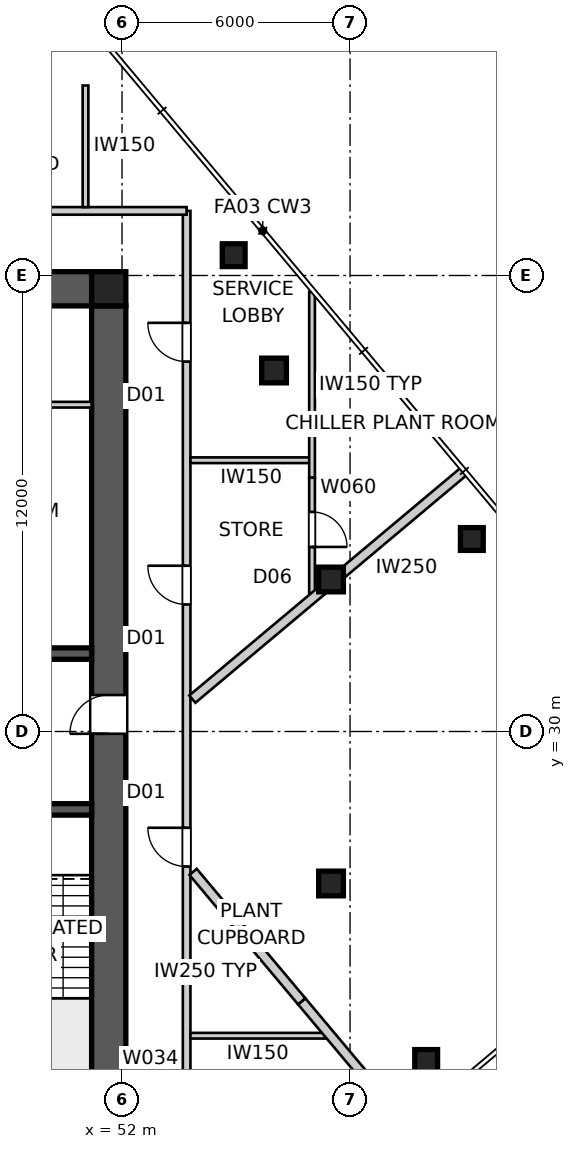
"""IFC4 building model, lengths in metres.
Left out: names, types, materials, properties, quantities, classifications, styles, units other than length and angle.
Written with IfcOpenShell. Run it as: python <this file> out.ifc"""

import sys

from ifc_helpers import new_model, si_unit, direction, frame, frame_2d, origin, origin_2d, place, context, subcontext, project, spatial, polyline, rectangle, outline, extrude, element, fill, save


model = new_model("IFC4")
c1 = context("Model", 3, precision=1e-05, world=origin(), true_north=direction((0.0, 1.0)))
c2 = subcontext(c1, "Body", "Model", "MODEL_VIEW")
j1 = project(units=[si_unit("LENGTHUNIT", "METRE"), si_unit("PLANEANGLEUNIT", "RADIAN")], contexts=[c1])
p1 = place(None, origin())
s1 = spatial("IfcSite", under=j1, at=p1, CompositionType="ELEMENT")
p2 = place(p1, origin())
s2 = spatial("IfcBuilding", under=s1, at=p2, CompositionType="ELEMENT")
p3 = place(p2, frame((0.0, 0.0, 299.8)))
s3 = spatial("IfcBuildingStorey", under=s2, at=p3, CompositionType="ELEMENT", Elevation=299.8)
p4 = place(p3, frame((28.8, 41.65, 0.0), z_axis=(0.0, 0.0, 1.0), x_axis=(1.0, 0.0, 0.0)))
e1 = element("IfcWall", 1, at=p4, inside=s3, PredefinedType="SHEAR", context=c2, shape_type="SweptSolid", body=[
    extrude(outline(polyline([(0.0, -0.45), (22.4, -0.45), (22.4, -0.025), (22.85, -0.025), (22.85, 0.025), (22.4, 0.025), (22.4, 0.45), (0.0, 0.45), (0.0, 0.025), (-0.45, 0.025), (-0.45, -0.025), (0.0, -0.025), (0.0, -0.45)])), origin(), (0.0, 0.0, 1.0), 4.5),
])
p5 = place(p3, frame((51.65, 18.8, 0.0), z_axis=(0.0, 0.0, 1.0), x_axis=(0.0, 1.0, 0.0)))
e2 = element("IfcWall", 2, at=p5, inside=s3, PredefinedType="SHEAR", context=c2, shape_type="SweptSolid", body=[
    extrude(outline(polyline([(0.0, -0.45), (22.4, -0.45), (22.4, -0.025), (22.85, -0.025), (22.85, 0.025), (22.4, 0.025), (22.4, 0.45), (0.0, 0.45), (0.0, 0.025), (-0.45, 0.025), (-0.45, -0.025), (0.0, -0.025), (0.0, -0.45)])), origin(), (0.0, 0.0, 1.0), 4.5),
])
p6 = place(p5, frame((11.14, 0.0, 0.0)))
e3 = element("IfcOpeningElement", 3, at=p6, cuts=e2, PredefinedType="OPENING", context=c2, shape_type="SweptSolid", body=[
    extrude(rectangle(XDim=1.02, YDim=2.4, at=frame_2d((0.51, 1.2))), frame((0.0, 0.46, 0.0), z_axis=(0.0, -1.0, 0.0), x_axis=(1.0, 0.0, 0.0)), (0.0, 0.0, 1.0), 0.92),
])
p7 = place(p3, frame((28.8, 32.05, 0.0), z_axis=(0.0, 0.0, 1.0), x_axis=(1.0, 0.0, 0.0)))
e4 = element("IfcWall", 4, at=p7, inside=s3, PredefinedType="SHEAR", context=c2, shape_type="SweptSolid", body=[
    extrude(rectangle(XDim=22.4, YDim=0.3, at=frame_2d((11.2, 0.0))), origin(), (0.0, 0.0, 1.0), 4.5),
])
p8 = place(p7, frame((19.04, 0.0, 0.0)))
e5 = element("IfcOpeningElement", 5, at=p8, cuts=e4, PredefinedType="OPENING", context=c2, shape_type="SweptSolid", body=[
    extrude(rectangle(XDim=0.92, YDim=2.1, at=frame_2d((0.46, 1.05))), frame((0.0, 0.16, 0.0), z_axis=(0.0, -1.0, 0.0), x_axis=(1.0, 0.0, 0.0)), (0.0, 0.0, 1.0), 0.32),
])
p9 = place(p7, frame((1.265, 0.0, 0.0)))
e6 = element("IfcOpeningElement", 6, at=p9, cuts=e4, PredefinedType="OPENING", context=c2, shape_type="SweptSolid", body=[
    extrude(rectangle(XDim=1.02, YDim=2.1, at=frame_2d((0.51, 1.05))), frame((0.0, 0.16, 0.0), z_axis=(0.0, -1.0, 0.0), x_axis=(1.0, 0.0, 0.0)), (0.0, 0.0, 1.0), 0.32),
])
p10 = place(p7, frame((4.015, 0.0, 0.0)))
e7 = element("IfcOpeningElement", 7, at=p10, cuts=e4, PredefinedType="OPENING", context=c2, shape_type="SweptSolid", body=[
    extrude(rectangle(XDim=0.92, YDim=2.1, at=frame_2d((0.46, 1.05))), frame((0.0, 0.16, 0.0), z_axis=(0.0, -1.0, 0.0), x_axis=(1.0, 0.0, 0.0)), (0.0, 0.0, 1.0), 0.32),
])
p11 = place(p7, frame((7.015, 0.0, 0.0)))
e8 = element("IfcOpeningElement", 8, at=p11, cuts=e4, PredefinedType="OPENING", context=c2, shape_type="SweptSolid", body=[
    extrude(rectangle(XDim=0.92, YDim=2.1, at=frame_2d((0.46, 1.05))), frame((0.0, 0.16, 0.0), z_axis=(0.0, -1.0, 0.0), x_axis=(1.0, 0.0, 0.0)), (0.0, 0.0, 1.0), 0.32),
])
p12 = place(p7, frame((9.34, 0.0, 0.0)))
e9 = element("IfcOpeningElement", 9, at=p12, cuts=e4, PredefinedType="OPENING", context=c2, shape_type="SweptSolid", body=[
    extrude(rectangle(XDim=0.92, YDim=2.1, at=frame_2d((0.46, 1.05))), frame((0.0, 0.16, 0.0), z_axis=(0.0, -1.0, 0.0), x_axis=(1.0, 0.0, 0.0)), (0.0, 0.0, 1.0), 0.32),
])
p13 = place(p7, frame((14.85, 0.0, 0.0)))
e10 = element("IfcOpeningElement", 10, at=p13, cuts=e4, PredefinedType="OPENING", context=c2, shape_type="SweptSolid", body=[
    extrude(rectangle(XDim=1.1, YDim=2.1, at=frame_2d((0.55, 1.05))), frame((0.0, 0.16, 0.0), z_axis=(0.0, -1.0, 0.0), x_axis=(1.0, 0.0, 0.0)), (0.0, 0.0, 1.0), 0.32),
])
p14 = place(p3, frame((51.2, 27.95, 0.0), z_axis=(0.0, 0.0, 1.0), x_axis=(-1.0, 0.0, 0.0)))
e11 = element("IfcWall", 11, at=p14, inside=s3, PredefinedType="SHEAR", context=c2, shape_type="SweptSolid", body=[
    extrude(rectangle(XDim=22.4, YDim=0.3, at=frame_2d((11.2, 0.0))), origin(), (0.0, 0.0, 1.0), 4.5),
])
p15 = place(p14, frame((19.04, 0.0, 0.0)))
e12 = element("IfcOpeningElement", 12, at=p15, cuts=e11, PredefinedType="OPENING", context=c2, shape_type="SweptSolid", body=[
    extrude(rectangle(XDim=0.92, YDim=2.1, at=frame_2d((0.46, 1.05))), frame((0.0, 0.16, 0.0), z_axis=(0.0, -1.0, 0.0), x_axis=(1.0, 0.0, 0.0)), (0.0, 0.0, 1.0), 0.32),
])
p16 = place(p14, frame((1.265, 0.0, 0.0)))
e13 = element("IfcOpeningElement", 13, at=p16, cuts=e11, PredefinedType="OPENING", context=c2, shape_type="SweptSolid", body=[
    extrude(rectangle(XDim=1.02, YDim=2.1, at=frame_2d((0.51, 1.05))), frame((0.0, 0.16, 0.0), z_axis=(0.0, -1.0, 0.0), x_axis=(1.0, 0.0, 0.0)), (0.0, 0.0, 1.0), 0.32),
])
p17 = place(p14, frame((4.015, 0.0, 0.0)))
e14 = element("IfcOpeningElement", 14, at=p17, cuts=e11, PredefinedType="OPENING", context=c2, shape_type="SweptSolid", body=[
    extrude(rectangle(XDim=0.92, YDim=2.1, at=frame_2d((0.46, 1.05))), frame((0.0, 0.16, 0.0), z_axis=(0.0, -1.0, 0.0), x_axis=(1.0, 0.0, 0.0)), (0.0, 0.0, 1.0), 0.32),
])
p18 = place(p14, frame((9.79, 0.0, 0.0)))
e15 = element("IfcOpeningElement", 15, at=p18, cuts=e11, PredefinedType="OPENING", context=c2, shape_type="SweptSolid", body=[
    extrude(rectangle(XDim=0.92, YDim=2.1, at=frame_2d((0.46, 1.05))), frame((0.0, 0.16, 0.0), z_axis=(0.0, -1.0, 0.0), x_axis=(1.0, 0.0, 0.0)), (0.0, 0.0, 1.0), 0.32),
])
p19 = place(p14, frame((6.115, 0.0, 0.0)))
e16 = element("IfcOpeningElement", 16, at=p19, cuts=e11, PredefinedType="OPENING", context=c2, shape_type="SweptSolid", body=[
    extrude(rectangle(XDim=0.92, YDim=2.1, at=frame_2d((0.46, 1.05))), frame((0.0, 0.16, 0.0), z_axis=(0.0, -1.0, 0.0), x_axis=(1.0, 0.0, 0.0)), (0.0, 0.0, 1.0), 0.32),
])
p20 = place(p14, frame((14.85, 0.0, 0.0)))
e17 = element("IfcOpeningElement", 17, at=p20, cuts=e11, PredefinedType="OPENING", context=c2, shape_type="SweptSolid", body=[
    extrude(rectangle(XDim=1.1, YDim=2.1, at=frame_2d((0.55, 1.05))), frame((0.0, 0.16, 0.0), z_axis=(0.0, -1.0, 0.0), x_axis=(1.0, 0.0, 0.0)), (0.0, 0.0, 1.0), 0.32),
])
p21 = place(p3, frame((51.65, 41.65, 0.0), z_axis=(0.0, 0.0, 1.0), x_axis=(1.0, 0.0, 0.0)))
e18 = element("IfcColumn", 18, at=p21, inside=s3, PredefinedType="COLUMN", context=c2, shape_type="SweptSolid", body=[
    extrude(rectangle(XDim=0.9, YDim=0.9, at=origin_2d()), origin(), (0.0, 0.0, 1.0), 4.5),
])
for number, where, z_axis, x_axis in (
    (19, (60.003, 21.329, 0.0), (0.0, 0.0, 1.0), (1.0, 0.0, 0.0)),
    (20, (61.205, 35.065, 0.0), (0.0, 0.0, 1.0), (1.0, 0.0, 0.0)),
    (21, (54.938, 42.534, 0.0), (0.0, 0.0, 1.0), (1.0, 0.0, 0.0)),
):
    element("IfcColumn", number, at=place(p3, frame(where, z_axis=z_axis, x_axis=x_axis)), inside=s3, PredefinedType="COLUMN", context=c2, shape_type="SweptSolid", body=[
        extrude(rectangle(XDim=0.6, YDim=0.6, at=origin_2d()), origin(), (0.0, 0.0, 1.0), 4.5),
    ])
for number, where, z_axis, x_axis in (
    (22, (57.5, 26.0, 0.0), (0.0, 0.0, 1.0), (1.0, 0.0, 0.0)),
    (23, (57.5, 34.0, 0.0), (0.0, 0.0, 1.0), (1.0, 0.0, 0.0)),
    (24, (56.0, 39.5, 0.0), (0.0, 0.0, 1.0), (1.0, 0.0, 0.0)),
):
    element("IfcColumn", number, at=place(p3, frame(where, z_axis=z_axis, x_axis=x_axis)), inside=s3, PredefinedType="COLUMN", context=c2, shape_type="SweptSolid", body=[
        extrude(rectangle(XDim=0.65, YDim=0.65, at=origin_2d()), origin(), (0.0, 0.0, 1.0), 4.5),
    ])
p22 = place(p3, frame((53.7, 16.3, 0.0), z_axis=(0.0, 0.0, 1.0), x_axis=(0.0, 1.0, 0.0)))
e25 = element("IfcWall", 25, at=p22, inside=s3, PredefinedType="PARTITIONING", context=c2, shape_type="SweptSolid", body=[
    extrude(rectangle(XDim=27.4, YDim=0.2, at=frame_2d((13.7, 0.0))), origin(), (0.0, 0.0, 1.0), 4.3),
])
p23 = place(p22, frame((10.146, 0.0, 0.0)))
e26 = element("IfcOpeningElement", 26, at=p23, cuts=e25, PredefinedType="OPENING", context=c2, shape_type="SweptSolid", body=[
    extrude(rectangle(XDim=1.02, YDim=2.34, at=frame_2d((0.51, 1.17))), frame((0.0, 0.11, 0.0), z_axis=(0.0, -1.0, 0.0), x_axis=(1.0, 0.0, 0.0)), (0.0, 0.0, 1.0), 0.22),
])
p24 = place(p22, frame((17.042, 0.0, 0.0)))
e27 = element("IfcOpeningElement", 27, at=p24, cuts=e25, PredefinedType="OPENING", context=c2, shape_type="SweptSolid", body=[
    extrude(rectangle(XDim=1.02, YDim=2.34, at=frame_2d((0.51, 1.17))), frame((0.0, 0.11, 0.0), z_axis=(0.0, -1.0, 0.0), x_axis=(1.0, 0.0, 0.0)), (0.0, 0.0, 1.0), 0.22),
])
p25 = place(p22, frame((23.434, 0.0, 0.0)))
e28 = element("IfcOpeningElement", 28, at=p25, cuts=e25, PredefinedType="OPENING", context=c2, shape_type="SweptSolid", body=[
    extrude(rectangle(XDim=1.02, YDim=2.34, at=frame_2d((0.51, 1.17))), frame((0.0, 0.11, 0.0), z_axis=(0.0, -1.0, 0.0), x_axis=(1.0, 0.0, 0.0)), (0.0, 0.0, 1.0), 0.22),
])
p26 = place(p3, frame((53.7, 43.7, 0.0), z_axis=(0.0, 0.0, 1.0), x_axis=(-1.0, 0.0, 0.0)))
e29 = element("IfcWall", 29, at=p26, inside=s3, PredefinedType="PARTITIONING", context=c2, shape_type="SweptSolid", body=[
    extrude(rectangle(XDim=27.4, YDim=0.2, at=frame_2d((13.7, 0.0))), origin(), (0.0, 0.0, 1.0), 4.3),
])
p27 = place(p26, frame((20.621, 0.0, 0.0)))
e30 = element("IfcOpeningElement", 30, at=p27, cuts=e29, PredefinedType="OPENING", context=c2, shape_type="SweptSolid", body=[
    extrude(rectangle(XDim=1.02, YDim=2.34, at=frame_2d((0.51, 1.17))), frame((0.0, 0.11, 0.0), z_axis=(0.0, -1.0, 0.0), x_axis=(1.0, 0.0, 0.0)), (0.0, 0.0, 1.0), 0.22),
])
p28 = place(p26, frame((6.053, 0.0, 0.0)))
e31 = element("IfcOpeningElement", 31, at=p28, cuts=e29, PredefinedType="OPENING", context=c2, shape_type="SweptSolid", body=[
    extrude(rectangle(XDim=1.02, YDim=2.34, at=frame_2d((0.51, 1.17))), frame((0.0, 0.11, 0.0), z_axis=(0.0, -1.0, 0.0), x_axis=(1.0, 0.0, 0.0)), (0.0, 0.0, 1.0), 0.22),
])
p29 = place(p26, frame((12.574, 0.0, 0.0)))
e32 = element("IfcOpeningElement", 32, at=p29, cuts=e29, PredefinedType="OPENING", context=c2, shape_type="SweptSolid", body=[
    extrude(rectangle(XDim=1.02, YDim=2.34, at=frame_2d((0.51, 1.17))), frame((0.0, 0.11, 0.0), z_axis=(0.0, -1.0, 0.0), x_axis=(1.0, 0.0, 0.0)), (0.0, 0.0, 1.0), 0.22),
])
p30 = place(p3, frame((58.854, 20.365, 0.0), z_axis=(0.0, 0.0, 1.0), x_axis=(-0.642823301165, 0.766014492995, 0.0)))
e33 = element("IfcWall", 33, at=p30, inside=s3, PredefinedType="PARTITIONING", context=c2, shape_type="SweptSolid", body=[
    extrude(rectangle(XDim=3.308, YDim=0.25, at=frame_2d((1.654, 0.0))), origin(), (0.0, 0.0, 1.0), 3.688),
])
p31 = place(p3, frame((56.728, 22.899, 0.0), z_axis=(0.0, 0.0, 1.0), x_axis=(-0.642778620996, 0.766051985436, 0.0)))
e34 = element("IfcWall", 34, at=p31, inside=s3, PredefinedType="PARTITIONING", context=c2, shape_type="SweptSolid", body=[
    extrude(rectangle(XDim=4.446, YDim=0.25, at=frame_2d((2.223, 0.0))), origin(), (0.0, 0.0, 1.0), 4.3),
])
p32 = place(p3, frame((61.007, 36.857, 0.0), z_axis=(0.0, 0.0, 1.0), x_axis=(-0.766045019392, -0.64278692291, 0.0)))
e35 = element("IfcWall", 35, at=p32, inside=s3, PredefinedType="PARTITIONING", context=c2, shape_type="SweptSolid", body=[
    extrude(rectangle(XDim=9.343, YDim=0.25, at=frame_2d((4.671, 0.0))), origin(), (0.0, 0.0, 1.0), 4.3),
])
p33 = place(p3, frame((43.0, 38.6, 0.0), z_axis=(0.0, 0.0, 1.0), x_axis=(1.0, 0.0, 0.0)))
e36 = element("IfcWall", 36, at=p33, inside=s3, PredefinedType="SOLIDWALL", context=c2, shape_type="SweptSolid", body=[
    extrude(rectangle(XDim=8.2, YDim=0.15, at=frame_2d((4.1, 0.0))), origin(), (0.0, 0.0, 1.0), 4.3),
])
p34 = place(p33, frame((3.64, 0.0, 0.0)))
e37 = element("IfcOpeningElement", 37, at=p34, cuts=e36, PredefinedType="OPENING", context=c2, shape_type="SweptSolid", body=[
    extrude(rectangle(XDim=0.92, YDim=2.1, at=frame_2d((0.46, 1.05))), frame((0.0, 0.085, 0.0), z_axis=(0.0, -1.0, 0.0), x_axis=(1.0, 0.0, 0.0)), (0.0, 0.0, 1.0), 0.17),
])
p35 = place(p3, frame((53.8, 21.994, 0.0), z_axis=(0.0, 0.0, 1.0), x_axis=(1.0, 0.0, 0.0)))
e38 = element("IfcWall", 38, at=p35, inside=s3, PredefinedType="SOLIDWALL", context=c2, shape_type="SweptSolid", body=[
    extrude(rectangle(XDim=3.544, YDim=0.15, at=frame_2d((1.772, 0.0))), origin(), (0.0, 0.0, 1.0), 4.3),
])
for number, where, z_axis, x_axis in (
    (39, (51.039, 43.8, 0.0), (0.0, 0.0, 1.0), (0.0, 1.0, 0.0)),
    (40, (57.0, 37.138, 0.0), (0.0, 0.0, 1.0), (-1.0, 0.0, 0.0)),
):
    element("IfcWall", number, at=place(p3, frame(where, z_axis=z_axis, x_axis=x_axis)), inside=s3, PredefinedType="SOLIDWALL", context=c2, shape_type="SweptSolid", body=[
        extrude(rectangle(XDim=3.2, YDim=0.15, at=frame_2d((1.6, 0.0))), origin(), (0.0, 0.0, 1.0), 4.3),
    ])
p36 = place(p3, frame((57.0, 41.57, 0.0), z_axis=(0.0, 0.0, 1.0), x_axis=(0.0, -1.0, 0.0)))
e41 = element("IfcWall", 41, at=p36, inside=s3, PredefinedType="SOLIDWALL", context=c2, shape_type="SweptSolid", body=[
    extrude(rectangle(XDim=4.892, YDim=0.15, at=frame_2d((2.446, 0.0))), origin(), (0.0, 0.0, 1.0), 4.3),
])
p37 = place(p3, frame((57.0, 36.678, 0.0), z_axis=(0.0, 0.0, 1.0), x_axis=(0.0, -1.0, 0.0)))
e42 = element("IfcWall", 42, at=p37, inside=s3, PredefinedType="SOLIDWALL", context=c2, shape_type="SweptSolid", body=[
    extrude(rectangle(XDim=1.822, YDim=0.15, at=frame_2d((0.911, 0.0))), origin(), (0.0, 0.0, 1.0), 3.3),
])
p38 = place(p37, frame((0.902, 0.0, 0.0)))
e43 = element("IfcOpeningElement", 43, at=p38, cuts=e42, PredefinedType="OPENING", context=c2, shape_type="SweptSolid", body=[
    extrude(rectangle(XDim=0.92, YDim=2.1, at=frame_2d((0.46, 1.05))), frame((0.0, 0.085, 0.0), z_axis=(0.0, -1.0, 0.0), x_axis=(1.0, 0.0, 0.0)), (0.0, 0.0, 1.0), 0.17),
])
p39 = place(p3, frame((57.0, 34.857, 0.0), z_axis=(0.0, 0.0, 1.0), x_axis=(0.0, -1.0, 0.0)))
e44 = element("IfcWall", 44, at=p39, inside=s3, PredefinedType="SOLIDWALL", context=c2, shape_type="SweptSolid", body=[
    extrude(rectangle(XDim=1.362, YDim=0.15, at=frame_2d((0.681, 0.0))), origin(), (0.0, 0.0, 1.0), 4.3),
])
p40 = place(p23, origin())
e45 = element("IfcDoor", 45, at=p40, inside=s3, OperationType="SINGLE_SWING_RIGHT", PredefinedType="DOOR", context=c2, shape_type="SweptSolid", body=[
    extrude(rectangle(XDim=1.02, YDim=2.34, at=frame_2d((0.51, 1.17))), frame((0.0, 0.025, 0.0), z_axis=(0.0, -1.0, 0.0), x_axis=(1.0, 0.0, 0.0)), (0.0, 0.0, 1.0), 0.05),
])
fill(e26, e45)
p41 = place(p24, origin())
e46 = element("IfcDoor", 46, at=p41, inside=s3, OperationType="SINGLE_SWING_RIGHT", PredefinedType="DOOR", context=c2, shape_type="SweptSolid", body=[
    extrude(rectangle(XDim=1.02, YDim=2.34, at=frame_2d((0.51, 1.17))), frame((0.0, 0.025, 0.0), z_axis=(0.0, -1.0, 0.0), x_axis=(1.0, 0.0, 0.0)), (0.0, 0.0, 1.0), 0.05),
])
fill(e27, e46)
p42 = place(p25, origin())
e47 = element("IfcDoor", 47, at=p42, inside=s3, OperationType="SINGLE_SWING_RIGHT", PredefinedType="DOOR", context=c2, shape_type="SweptSolid", body=[
    extrude(rectangle(XDim=1.02, YDim=2.34, at=frame_2d((0.51, 1.17))), frame((0.0, 0.025, 0.0), z_axis=(0.0, -1.0, 0.0), x_axis=(1.0, 0.0, 0.0)), (0.0, 0.0, 1.0), 0.05),
])
fill(e28, e47)
p43 = place(p38, origin())
e48 = element("IfcDoor", 48, at=p43, inside=s3, OperationType="SINGLE_SWING_RIGHT", PredefinedType="DOOR", context=c2, shape_type="SweptSolid", body=[
    extrude(rectangle(XDim=0.92, YDim=2.1, at=frame_2d((0.46, 1.05))), frame((0.0, 0.025, 0.0), z_axis=(0.0, -1.0, 0.0), x_axis=(1.0, 0.0, 0.0)), (0.0, 0.0, 1.0), 0.05),
])
fill(e43, e48)
p44 = place(p6, origin())
e49 = element("IfcDoor", 49, at=p44, inside=s3, OperationType="SINGLE_SWING_LEFT", PredefinedType="DOOR", context=c2, shape_type="SweptSolid", body=[
    extrude(rectangle(XDim=1.02, YDim=2.4, at=frame_2d((0.51, 1.2))), frame((0.0, 0.025, 0.0), z_axis=(0.0, -1.0, 0.0), x_axis=(1.0, 0.0, 0.0)), (0.0, 0.0, 1.0), 0.05),
])
fill(e3, e49)
save(model, sys.argv[1])
